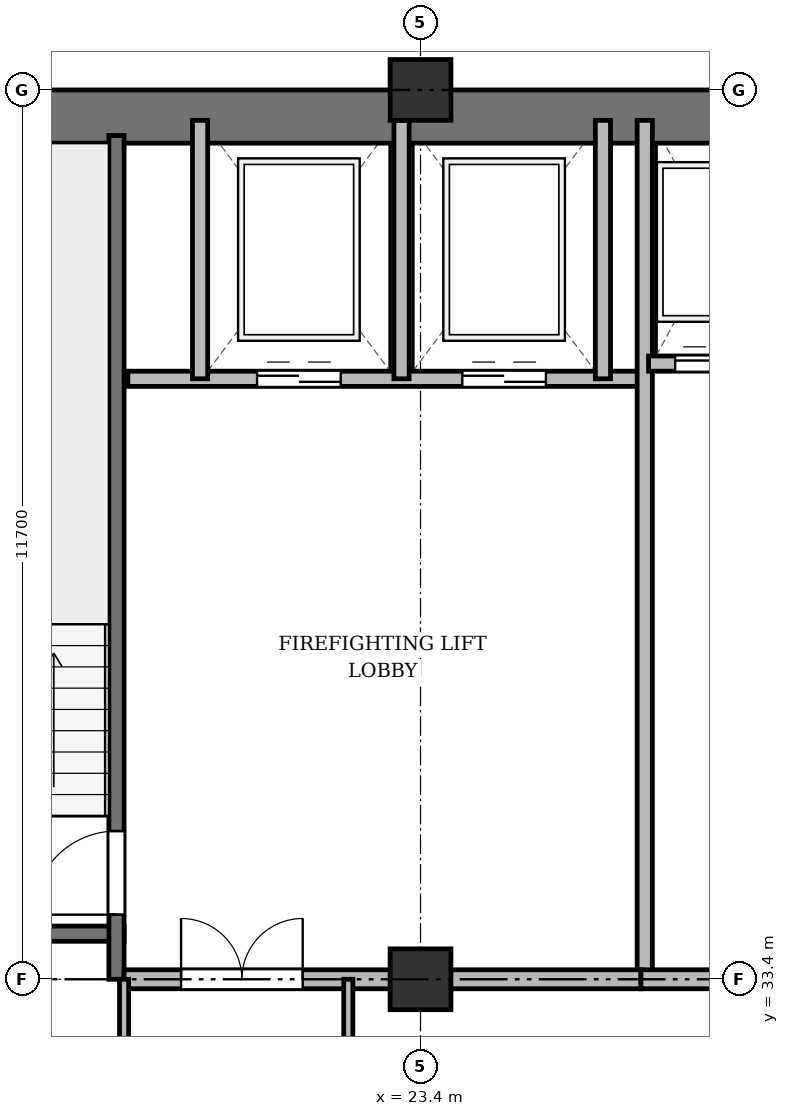
"""IFC4 building model, lengths in metres.
Left out: names, types, materials, properties, quantities, classifications, styles, units other than length and angle.
Written with IfcOpenShell. Run it as: python <this file> out.ifc"""

import sys

from ifc_helpers import new_model, si_unit, direction, frame, frame_2d, origin, origin_2d, place, context, subcontext, project, spatial, rectangle, extrude, source, transform, mapped, element, fill, save


model = new_model("IFC4")
c1 = context("Model", 3, precision=1e-05, world=origin(), true_north=direction((0.0, 1.0)))
c2 = subcontext(c1, "Body", "Model", "MODEL_VIEW")
j1 = project(units=[si_unit("LENGTHUNIT", "METRE"), si_unit("PLANEANGLEUNIT", "RADIAN")], contexts=[c1])
p1 = place(None, origin())
s1 = spatial("IfcSite", under=j1, at=p1, CompositionType="ELEMENT")
p2 = place(p1, origin())
s2 = spatial("IfcBuilding", under=s1, at=p2, CompositionType="ELEMENT")
p3 = place(p2, frame((0.0, 0.0, 128.5)))
s3 = spatial("IfcBuildingStorey", under=s2, at=p3, CompositionType="ELEMENT", Elevation=128.5)
m1 = source(origin(), c2, "Body", "SweptSolid", [
    extrude(rectangle(XDim=0.8, YDim=0.8, at=origin_2d()), origin(), (0.0, 0.0, 1.0), 3.6),
])
for number, where, z_axis, x_axis in (
    (1, (23.4, 33.4, 0.0), (0.0, 0.0, 1.0), (1.0, 0.0, 0.0)),
    (2, (23.4, 45.1, 0.0), (0.0, 0.0, 1.0), (1.0, 0.0, 0.0)),
):
    element("IfcColumn", number, at=place(p3, frame(where, z_axis=z_axis, x_axis=x_axis)), inside=s3, PredefinedType="COLUMN", context=c2, shape_type="MappedRepresentation", body=[
        mapped(m1, transform((0.0, 0.0, 0.0), x_axis=(1.0, 0.0, 0.0), y_axis=(0.0, 1.0, 0.0), z_axis=(0.0, 0.0, 1.0), scale=1.0)),
    ])
p4 = place(p3, frame((15.5, 44.75, 0.0), z_axis=(0.0, 0.0, 1.0), x_axis=(1.0, 0.0, 0.0)))
e3 = element("IfcWall", 3, at=p4, inside=s3, PredefinedType="SHEAR", context=c2, shape_type="SweptSolid", body=[
    extrude(rectangle(XDim=43.4, YDim=0.7, at=frame_2d((21.7, 0.0))), origin(), (0.0, 0.0, 1.0), 3.22),
])
p5 = place(p3, frame((16.1, 34.0, 0.0), z_axis=(0.0, 0.0, 1.0), x_axis=(1.0, 0.0, 0.0)))
e4 = element("IfcWall", 4, at=p5, inside=s3, PredefinedType="SHEAR", context=c2, shape_type="SweptSolid", body=[
    extrude(rectangle(XDim=3.4, YDim=0.2, at=frame_2d((1.7, 0.0))), origin(), (0.0, 0.0, 1.0), 3.22),
])
p6 = place(p3, frame((19.4, 33.4, 0.0), z_axis=(0.0, 0.0, 1.0), x_axis=(0.0, 1.0, 0.0)))
e5 = element("IfcWall", 5, at=p6, inside=s3, PredefinedType="SHEAR", context=c2, shape_type="SweptSolid", body=[
    extrude(rectangle(XDim=11.1, YDim=0.2, at=frame_2d((5.55, 0.0))), origin(), (0.0, 0.0, 1.0), 3.22),
])
p7 = place(p6, frame((0.85, 0.0, 0.0)))
e6 = element("IfcOpeningElement", 6, at=p7, cuts=e5, PredefinedType="OPENING", context=c2, shape_type="SweptSolid", body=[
    extrude(rectangle(XDim=1.1, YDim=2.15, at=frame_2d((0.55, 1.075))), frame((0.0, 0.11, 0.0), z_axis=(0.0, -1.0, 0.0), x_axis=(1.0, 0.0, 0.0)), (0.0, 0.0, 1.0), 0.22),
])
p8 = place(p3, frame((19.55, 41.3, 0.0), z_axis=(0.0, 0.0, 1.0), x_axis=(1.0, 0.0, 0.0)))
e7 = element("IfcWall", 7, at=p8, inside=s3, PredefinedType="SOLIDWALL", context=c2, shape_type="SweptSolid", body=[
    extrude(rectangle(XDim=6.75, YDim=0.2, at=frame_2d((3.375, 0.0))), origin(), (0.0, 0.0, 1.0), 3.22),
])
p9 = place(p8, frame((1.7, 0.0, 0.0)))
e8 = element("IfcOpeningElement", 8, at=p9, cuts=e7, PredefinedType="OPENING", context=c2, shape_type="SweptSolid", body=[
    extrude(rectangle(XDim=1.1, YDim=2.15, at=frame_2d((0.55, 1.075))), frame((0.0, 0.11, 0.0), z_axis=(0.0, -1.0, 0.0), x_axis=(1.0, 0.0, 0.0)), (0.0, 0.0, 1.0), 0.22),
])
p10 = place(p8, frame((4.4, 0.0, 0.0)))
e9 = element("IfcOpeningElement", 9, at=p10, cuts=e7, PredefinedType="OPENING", context=c2, shape_type="SweptSolid", body=[
    extrude(rectangle(XDim=1.1, YDim=2.15, at=frame_2d((0.55, 1.075))), frame((0.0, 0.11, 0.0), z_axis=(0.0, -1.0, 0.0), x_axis=(1.0, 0.0, 0.0)), (0.0, 0.0, 1.0), 0.22),
])
for number, where, z_axis, x_axis in (
    (10, (20.5, 41.3, 0.0), (0.0, 0.0, 1.0), (0.0, 1.0, 0.0)),
    (11, (23.15, 41.3, 0.0), (0.0, 0.0, 1.0), (0.0, 1.0, 0.0)),
    (12, (25.8, 41.3, 0.0), (0.0, 0.0, 1.0), (0.0, 1.0, 0.0)),
):
    element("IfcWall", number, at=place(p3, frame(where, z_axis=z_axis, x_axis=x_axis)), inside=s3, PredefinedType="SOLIDWALL", context=c2, shape_type="SweptSolid", body=[
        extrude(rectangle(XDim=3.4, YDim=0.2, at=frame_2d((1.7, 0.0))), origin(), (0.0, 0.0, 1.0), 3.22),
    ])
p11 = place(p3, frame((26.35, 33.4, 0.0), z_axis=(0.0, 0.0, 1.0), x_axis=(0.0, 1.0, 0.0)))
e13 = element("IfcWall", 13, at=p11, inside=s3, PredefinedType="SOLIDWALL", context=c2, shape_type="SweptSolid", body=[
    extrude(rectangle(XDim=11.3, YDim=0.2, at=frame_2d((5.65, 0.0))), origin(), (0.0, 0.0, 1.0), 2.632),
])
p12 = place(p3, frame((19.5, 33.4, 0.0), z_axis=(0.0, 0.0, 1.0), x_axis=(1.0, 0.0, 0.0)))
e14 = element("IfcWall", 14, at=p12, inside=s3, PredefinedType="PARTITIONING", context=c2, shape_type="SweptSolid", body=[
    extrude(rectangle(XDim=6.8, YDim=0.25, at=frame_2d((3.4, 0.0))), origin(), (0.0, 0.0, 1.0), 2.632),
])
p13 = place(p12, frame((0.75, 0.0, 0.0)))
e15 = element("IfcOpeningElement", 15, at=p13, cuts=e14, PredefinedType="OPENING", context=c2, shape_type="SweptSolid", body=[
    extrude(rectangle(XDim=1.6, YDim=2.2, at=frame_2d((0.8, 1.1))), frame((0.0, 0.135, 0.0), z_axis=(0.0, -1.0, 0.0), x_axis=(1.0, 0.0, 0.0)), (0.0, 0.0, 1.0), 0.27),
])
p14 = place(p3, frame((26.4, 41.5, 0.0), z_axis=(0.0, 0.0, 1.0), x_axis=(1.0, 0.0, 0.0)))
e16 = element("IfcWall", 16, at=p14, inside=s3, PredefinedType="SOLIDWALL", context=c2, shape_type="SweptSolid", body=[
    extrude(rectangle(XDim=6.95, YDim=0.2, at=frame_2d((3.475, 0.0))), origin(), (0.0, 0.0, 1.0), 3.22),
])
p15 = place(p14, frame((0.35, 0.0, 0.0)))
e17 = element("IfcOpeningElement", 17, at=p15, cuts=e16, PredefinedType="OPENING", context=c2, shape_type="SweptSolid", body=[
    extrude(rectangle(XDim=1.05, YDim=2.15, at=frame_2d((0.525, 1.075))), frame((0.0, 0.11, 0.0), z_axis=(0.0, -1.0, 0.0), x_axis=(1.0, 0.0, 0.0)), (0.0, 0.0, 1.0), 0.22),
])
p16 = place(p14, frame((2.05, 0.0, 0.0)))
e18 = element("IfcOpeningElement", 18, at=p16, cuts=e16, PredefinedType="OPENING", context=c2, shape_type="SweptSolid", body=[
    extrude(rectangle(XDim=1.05, YDim=2.15, at=frame_2d((0.525, 1.075))), frame((0.0, 0.11, 0.0), z_axis=(0.0, -1.0, 0.0), x_axis=(1.0, 0.0, 0.0)), (0.0, 0.0, 1.0), 0.22),
])
p17 = place(p14, frame((3.75, 0.0, 0.0)))
e19 = element("IfcOpeningElement", 19, at=p17, cuts=e16, PredefinedType="OPENING", context=c2, shape_type="SweptSolid", body=[
    extrude(rectangle(XDim=1.05, YDim=2.15, at=frame_2d((0.525, 1.075))), frame((0.0, 0.11, 0.0), z_axis=(0.0, -1.0, 0.0), x_axis=(1.0, 0.0, 0.0)), (0.0, 0.0, 1.0), 0.22),
])
p18 = place(p14, frame((5.45, 0.0, 0.0)))
e20 = element("IfcOpeningElement", 20, at=p18, cuts=e16, PredefinedType="OPENING", context=c2, shape_type="SweptSolid", body=[
    extrude(rectangle(XDim=1.05, YDim=2.15, at=frame_2d((0.525, 1.075))), frame((0.0, 0.11, 0.0), z_axis=(0.0, -1.0, 0.0), x_axis=(1.0, 0.0, 0.0)), (0.0, 0.0, 1.0), 0.22),
])
p19 = place(p3, frame((26.3, 33.4, 0.0), z_axis=(0.0, 0.0, 1.0), x_axis=(1.0, 0.0, 0.0)))
e21 = element("IfcWall", 21, at=p19, inside=s3, PredefinedType="PARTITIONING", context=c2, shape_type="SweptSolid", body=[
    extrude(rectangle(XDim=20.85, YDim=0.25, at=frame_2d((10.425, 0.0))), origin(), (0.0, 0.0, 1.0), 2.632),
])
p20 = place(p19, frame((9.2, 0.0, 0.0)))
e22 = element("IfcOpeningElement", 22, at=p20, cuts=e21, PredefinedType="OPENING", context=c2, shape_type="SweptSolid", body=[
    extrude(rectangle(XDim=1.6, YDim=2.2, at=frame_2d((0.8, 1.1))), frame((0.0, 0.135, 0.0), z_axis=(0.0, -1.0, 0.0), x_axis=(1.0, 0.0, 0.0)), (0.0, 0.0, 1.0), 0.27),
])
for number, where, z_axis, x_axis in (
    (23, (19.5, 29.8, 0.0), (0.0, 0.0, 1.0), (0.0, 1.0, 0.0)),
    (24, (22.45, 29.8, 0.0), (0.0, 0.0, 1.0), (0.0, 1.0, 0.0)),
):
    element("IfcWall", number, at=place(p3, frame(where, z_axis=z_axis, x_axis=x_axis)), inside=s3, PredefinedType="PARTITIONING", context=c2, shape_type="SweptSolid", body=[
        extrude(rectangle(XDim=3.6, YDim=0.12, at=frame_2d((1.8, 0.0))), origin(), (0.0, 0.0, 1.0), 2.632),
    ])
m2 = source(origin(), c2, "Body", "SweptSolid", [
    extrude(rectangle(XDim=1.1, YDim=2.15, at=frame_2d((0.55, 1.075))), frame((0.0, 0.025, 0.0), z_axis=(0.0, -1.0, 0.0), x_axis=(1.0, 0.0, 0.0)), (0.0, 0.0, 1.0), 0.05),
])
p21 = place(p7, origin())
e25 = element("IfcDoor", 25, at=p21, inside=s3, OperationType="SINGLE_SWING_LEFT", PredefinedType="DOOR", context=c2, shape_type="MappedRepresentation", body=[
    mapped(m2, transform((0.0, 0.0, 0.0), x_axis=(1.0, 0.0, 0.0), y_axis=(0.0, 1.0, 0.0), z_axis=(0.0, 0.0, 1.0), scale=1.0)),
])
fill(e6, e25)
p22 = place(p9, origin())
e26 = element("IfcDoor", 26, at=p22, inside=s3, OperationType="DOUBLE_DOOR_SLIDING", PredefinedType="DOOR", context=c2, shape_type="MappedRepresentation", body=[
    mapped(m2, transform((0.0, 0.0, 0.0), x_axis=(1.0, 0.0, 0.0), y_axis=(0.0, 1.0, 0.0), z_axis=(0.0, 0.0, 1.0), scale=1.0)),
])
fill(e8, e26)
p23 = place(p10, origin())
e27 = element("IfcDoor", 27, at=p23, inside=s3, OperationType="DOUBLE_DOOR_SLIDING", PredefinedType="DOOR", context=c2, shape_type="MappedRepresentation", body=[
    mapped(m2, transform((0.0, 0.0, 0.0), x_axis=(1.0, 0.0, 0.0), y_axis=(0.0, 1.0, 0.0), z_axis=(0.0, 0.0, 1.0), scale=1.0)),
])
fill(e9, e27)
m3 = source(origin(), c2, "Body", "SweptSolid", [
    extrude(rectangle(XDim=1.6, YDim=2.2, at=frame_2d((0.8, 1.1))), frame((0.0, 0.025, 0.0), z_axis=(0.0, -1.0, 0.0), x_axis=(1.0, 0.0, 0.0)), (0.0, 0.0, 1.0), 0.05),
])
p24 = place(p13, origin())
e28 = element("IfcDoor", 28, at=p24, inside=s3, OperationType="DOUBLE_DOOR_SINGLE_SWING", PredefinedType="DOOR", context=c2, shape_type="MappedRepresentation", body=[
    mapped(m3, transform((0.0, 0.0, 0.0), x_axis=(1.0, 0.0, 0.0), y_axis=(0.0, 1.0, 0.0), z_axis=(0.0, 0.0, 1.0), scale=1.0)),
])
fill(e15, e28)
m4 = source(origin(), c2, "Body", "SweptSolid", [
    extrude(rectangle(XDim=1.05, YDim=2.15, at=frame_2d((0.525, 1.075))), frame((0.0, 0.025, 0.0), z_axis=(0.0, -1.0, 0.0), x_axis=(1.0, 0.0, 0.0)), (0.0, 0.0, 1.0), 0.05),
])
p25 = place(p15, origin())
e29 = element("IfcDoor", 29, at=p25, inside=s3, OperationType="DOUBLE_DOOR_SLIDING", PredefinedType="DOOR", context=c2, shape_type="MappedRepresentation", body=[
    mapped(m4, transform((0.0, 0.0, 0.0), x_axis=(1.0, 0.0, 0.0), y_axis=(0.0, 1.0, 0.0), z_axis=(0.0, 0.0, 1.0), scale=1.0)),
])
fill(e17, e29)
save(model, sys.argv[1])
